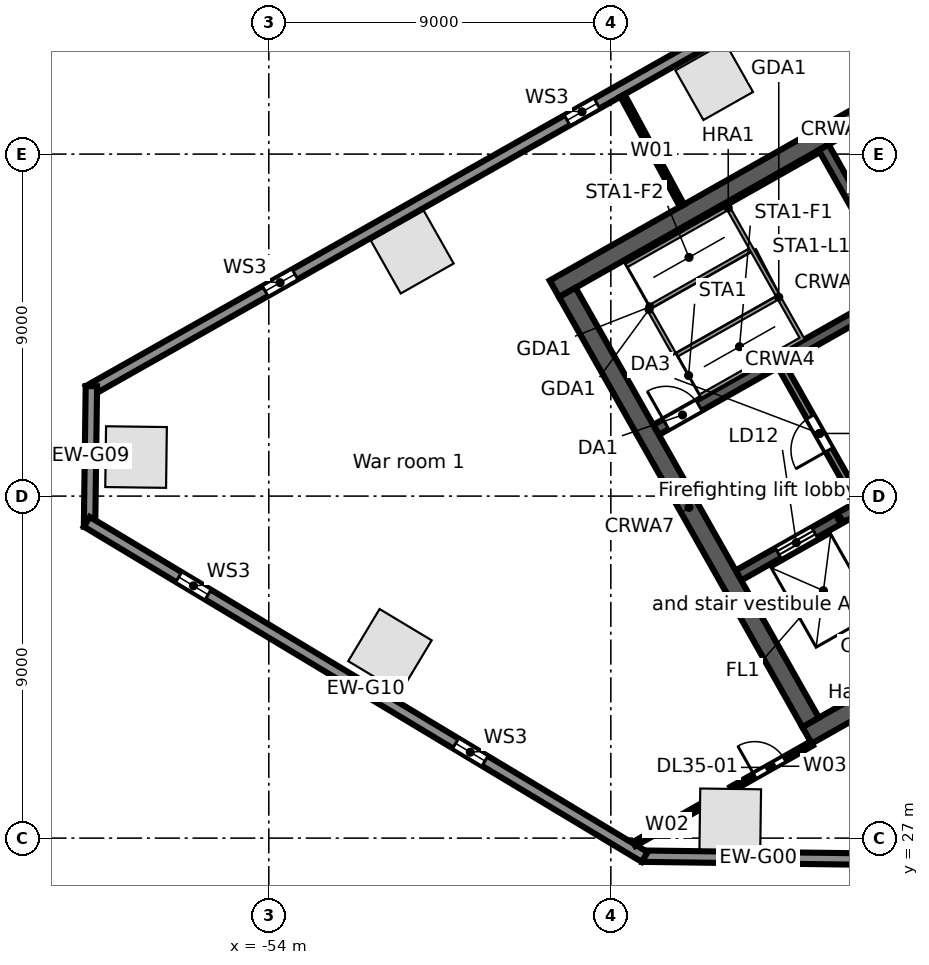
"""IFC4 building model, lengths in metres.
Left out: names, types, materials, properties, quantities, classifications, styles, units other than length and angle.
Written with IfcOpenShell. Run it as: python <this file> out.ifc"""

import sys

from ifc_helpers import new_model, si_unit, direction, frame, frame_2d, origin, origin_2d, place, context, subcontext, project, spatial, rectangle, extrude, element, fill, save


model = new_model("IFC4")
c1 = context("Model", 3, precision=1e-05, world=origin(), true_north=direction((0.0, 1.0)))
c2 = subcontext(c1, "Body", "Model", "MODEL_VIEW")
j1 = project(units=[si_unit("LENGTHUNIT", "METRE"), si_unit("PLANEANGLEUNIT", "RADIAN")], contexts=[c1])
p1 = place(None, origin())
s1 = spatial("IfcSite", under=j1, at=p1, CompositionType="ELEMENT")
p2 = place(p1, origin())
s2 = spatial("IfcBuilding", under=s1, at=p2, CompositionType="ELEMENT")
p3 = place(p2, frame((0.0, 0.0, 166.9)))
s3 = spatial("IfcBuildingStorey", under=s2, at=p3, CompositionType="ELEMENT", Elevation=166.9)
p4 = place(p3, frame((-42.28, 46.919, 0.0), z_axis=(0.0, 0.0, 1.0), x_axis=(-0.87035569594, -0.492423560103, 0.0)))
e1 = element("IfcColumn", 1, at=p4, inside=s3, PredefinedType="COLUMN", context=c2, shape_type="SweptSolid", body=[
    extrude(rectangle(XDim=1.5, YDim=1.5, at=origin_2d()), origin(), (0.0, 0.0, 1.0), 4.0),
])
for number, where, z_axis, x_axis in (
    (2, (-50.226, 42.423, 0.0), (0.0, 0.0, 1.0), (-0.87, -0.492, 0.0)),
    (3, (-57.493, 37.027, 0.0), (0.0, 0.0, 1.0), (-0.013, -1.0, 0.0)),
    (4, (-50.812, 31.931, 0.0), (0.0, 0.0, 1.0), (0.857, -0.515, 0.0)),
    (5, (-41.858, 27.495, 0.0), (0.0, 0.0, 1.0), (1.0, -0.013, 0.0)),
):
    element("IfcColumn", number, at=place(p3, frame(where, z_axis=z_axis, x_axis=x_axis)), inside=s3, PredefinedType="COLUMN", context=c2, shape_type="SweptSolid", body=[
        extrude(rectangle(XDim=1.6, YDim=1.6, at=origin_2d()), origin(), (0.0, 0.0, 1.0), 4.0),
    ])
p5 = place(p3, frame((-38.057, 26.445, 0.0), z_axis=(0.0, 0.0, 1.0), x_axis=(-0.999914086342, 0.013108010296, 0.0)))
e6 = element("IfcWall", 6, at=p5, inside=s3, PredefinedType="STANDARD", context=c2, shape_type="SweptSolid", body=[
    extrude(rectangle(XDim=6.128, YDim=0.3, at=frame_2d((3.064, 0.0))), origin(), (0.0, 0.0, 1.0), 3.68),
])
p6 = place(p3, frame((-58.745, 38.764, 0.0), z_axis=(0.0, 0.0, 1.0), x_axis=(0.870355811726, 0.492423355453, 0.0)))
e7 = element("IfcWall", 7, at=p6, inside=s3, PredefinedType="STANDARD", context=c2, shape_type="SweptSolid", body=[
    extrude(rectangle(XDim=64.025, YDim=0.3, at=frame_2d((32.013, 0.0))), origin(), (0.0, 0.0, 1.0), 3.68),
])
p7 = place(p6, frame((60.122, 0.0, 0.6)))
e8 = element("IfcOpeningElement", 8, at=p7, cuts=e7, PredefinedType="OPENING", context=c2, shape_type="SweptSolid", body=[
    extrude(rectangle(XDim=0.9, YDim=2.4, at=frame_2d((0.45, 1.2))), frame((0.0, 0.16, 0.0), z_axis=(0.0, -1.0, 0.0), x_axis=(1.0, 0.0, 0.0)), (0.0, 0.0, 1.0), 0.32),
])
p8 = place(p6, frame((50.992, 0.0, 0.6)))
e9 = element("IfcOpeningElement", 9, at=p8, cuts=e7, PredefinedType="OPENING", context=c2, shape_type="SweptSolid", body=[
    extrude(rectangle(XDim=0.9, YDim=2.4, at=frame_2d((0.45, 1.2))), frame((0.0, 0.16, 0.0), z_axis=(0.0, -1.0, 0.0), x_axis=(1.0, 0.0, 0.0)), (0.0, 0.0, 1.0), 0.32),
])
p9 = place(p6, frame((41.862, 0.0, 0.6)))
e10 = element("IfcOpeningElement", 10, at=p9, cuts=e7, PredefinedType="OPENING", context=c2, shape_type="SweptSolid", body=[
    extrude(rectangle(XDim=0.9, YDim=2.4, at=frame_2d((0.45, 1.2))), frame((0.0, 0.16, 0.0), z_axis=(0.0, -1.0, 0.0), x_axis=(1.0, 0.0, 0.0)), (0.0, 0.0, 1.0), 0.32),
])
p10 = place(p6, frame((32.732, 0.0, 0.6)))
e11 = element("IfcOpeningElement", 11, at=p10, cuts=e7, PredefinedType="OPENING", context=c2, shape_type="SweptSolid", body=[
    extrude(rectangle(XDim=0.9, YDim=2.4, at=frame_2d((0.45, 1.2))), frame((0.0, 0.16, 0.0), z_axis=(0.0, -1.0, 0.0), x_axis=(1.0, 0.0, 0.0)), (0.0, 0.0, 1.0), 0.32),
])
p11 = place(p6, frame((23.602, 0.0, 0.6)))
e12 = element("IfcOpeningElement", 12, at=p11, cuts=e7, PredefinedType="OPENING", context=c2, shape_type="SweptSolid", body=[
    extrude(rectangle(XDim=0.9, YDim=2.4, at=frame_2d((0.45, 1.2))), frame((0.0, 0.16, 0.0), z_axis=(0.0, -1.0, 0.0), x_axis=(1.0, 0.0, 0.0)), (0.0, 0.0, 1.0), 0.32),
])
p12 = place(p6, frame((14.472, 0.0, 0.6)))
e13 = element("IfcOpeningElement", 13, at=p12, cuts=e7, PredefinedType="OPENING", context=c2, shape_type="SweptSolid", body=[
    extrude(rectangle(XDim=0.9, YDim=2.4, at=frame_2d((0.45, 1.2))), frame((0.0, 0.16, 0.0), z_axis=(0.0, -1.0, 0.0), x_axis=(1.0, 0.0, 0.0)), (0.0, 0.0, 1.0), 0.32),
])
p13 = place(p6, frame((5.342, 0.0, 0.6)))
e14 = element("IfcOpeningElement", 14, at=p13, cuts=e7, PredefinedType="OPENING", context=c2, shape_type="SweptSolid", body=[
    extrude(rectangle(XDim=0.9, YDim=2.4, at=frame_2d((0.45, 1.2))), frame((0.0, 0.16, 0.0), z_axis=(0.0, -1.0, 0.0), x_axis=(1.0, 0.0, 0.0)), (0.0, 0.0, 1.0), 0.32),
])
p14 = place(p3, frame((-58.717, 35.194, 0.0), z_axis=(0.0, 0.0, 1.0), x_axis=(0.013069053407, 0.999914596275, 0.0)))
e15 = element("IfcWall", 15, at=p14, inside=s3, PredefinedType="STANDARD", context=c2, shape_type="SweptSolid", body=[
    extrude(rectangle(XDim=3.699, YDim=0.3, at=frame_2d((1.849, 0.0))), origin(), (0.0, 0.0, 1.0), 3.68),
])
p15 = place(p3, frame((-44.109, 26.504, 0.0), z_axis=(0.0, 0.0, 1.0), x_axis=(-0.857169502585, 0.515034410344, 0.0)))
e16 = element("IfcWall", 16, at=p15, inside=s3, PredefinedType="STANDARD", context=c2, shape_type="SweptSolid", body=[
    extrude(rectangle(XDim=17.127, YDim=0.3, at=frame_2d((8.563, 0.0))), origin(), (0.0, 0.0, 1.0), 3.68),
])
p16 = place(p15, frame((13.403, 0.0, 0.6)))
e17 = element("IfcOpeningElement", 17, at=p16, cuts=e16, PredefinedType="OPENING", context=c2, shape_type="SweptSolid", body=[
    extrude(rectangle(XDim=0.9, YDim=2.4, at=frame_2d((0.45, 1.2))), frame((0.0, 0.16, 0.0), z_axis=(0.0, -1.0, 0.0), x_axis=(1.0, 0.0, 0.0)), (0.0, 0.0, 1.0), 0.32),
])
p17 = place(p15, frame((4.903, 0.0, 0.6)))
e18 = element("IfcOpeningElement", 18, at=p17, cuts=e16, PredefinedType="OPENING", context=c2, shape_type="SweptSolid", body=[
    extrude(rectangle(XDim=0.9, YDim=2.4, at=frame_2d((0.45, 1.2))), frame((0.0, 0.16, 0.0), z_axis=(0.0, -1.0, 0.0), x_axis=(1.0, 0.0, 0.0)), (0.0, 0.0, 1.0), 0.32),
])
p18 = place(p3, frame((-39.838, 29.705, 0.0), z_axis=(0.0, 0.0, 1.0), x_axis=(0.870350116061, 0.492433422375, 0.0)))
e19 = element("IfcWall", 19, at=p18, inside=s3, PredefinedType="SOLIDWALL", context=c2, shape_type="SweptSolid", body=[
    extrude(rectangle(XDim=17.0, YDim=0.5, at=frame_2d((8.5, 0.0))), origin(), (0.0, 0.0, 1.0), 3.68),
])
p19 = place(p18, frame((7.2, 0.0, 0.0)))
e20 = element("IfcOpeningElement", 20, at=p19, cuts=e19, PredefinedType="OPENING", context=c2, shape_type="SweptSolid", body=[
    extrude(rectangle(XDim=1.2, YDim=2.1, at=frame_2d((0.6, 1.05))), frame((0.0, 0.26, 0.0), z_axis=(0.0, -1.0, 0.0), x_axis=(1.0, 0.0, 0.0)), (0.0, 0.0, 1.0), 0.52),
])
p20 = place(p3, frame((-41.643, 33.912, 0.0), z_axis=(0.0, 0.0, 1.0), x_axis=(0.870343599782, 0.492444939378, 0.0)))
e21 = element("IfcWall", 21, at=p20, inside=s3, PredefinedType="SOLIDWALL", context=c2, shape_type="SweptSolid", body=[
    extrude(rectangle(XDim=6.1, YDim=0.3, at=frame_2d((3.05, 0.0))), origin(), (0.0, 0.0, 1.0), 3.68),
])
p21 = place(p20, frame((1.2, 0.0, 0.0)))
e22 = element("IfcOpeningElement", 22, at=p21, cuts=e21, PredefinedType="OPENING", context=c2, shape_type="SweptSolid", body=[
    extrude(rectangle(XDim=1.1, YDim=2.1, at=frame_2d((0.55, 1.05))), frame((0.0, 0.16, 0.0), z_axis=(0.0, -1.0, 0.0), x_axis=(1.0, 0.0, 0.0)), (0.0, 0.0, 1.0), 0.32),
])
p22 = place(p20, frame((4.35, 0.0, 0.0)))
e23 = element("IfcOpeningElement", 23, at=p22, cuts=e21, PredefinedType="OPENING", context=c2, shape_type="SweptSolid", body=[
    extrude(rectangle(XDim=1.1, YDim=2.1, at=frame_2d((0.55, 1.05))), frame((0.0, 0.16, 0.0), z_axis=(0.0, -1.0, 0.0), x_axis=(1.0, 0.0, 0.0)), (0.0, 0.0, 1.0), 0.32),
])
p23 = place(p3, frame((-43.81, 37.741, 0.0), z_axis=(0.0, 0.0, 1.0), x_axis=(0.870350569555, 0.492432620848, 0.0)))
e24 = element("IfcWall", 24, at=p23, inside=s3, PredefinedType="SOLIDWALL", context=c2, shape_type="SweptSolid", body=[
    extrude(rectangle(XDim=7.5, YDim=0.3, at=frame_2d((3.75, 0.0))), origin(), (0.0, 0.0, 1.0), 3.68),
])
p24 = place(p23, frame((0.3, 0.0, 0.0)))
e25 = element("IfcOpeningElement", 25, at=p24, cuts=e24, PredefinedType="OPENING", context=c2, shape_type="SweptSolid", body=[
    extrude(rectangle(XDim=1.0, YDim=2.1, at=frame_2d((0.5, 1.05))), frame((0.0, 0.16, 0.0), z_axis=(0.0, -1.0, 0.0), x_axis=(1.0, 0.0, 0.0)), (0.0, 0.0, 1.0), 0.32),
])
p25 = place(p3, frame((-46.486, 41.455, 0.0), z_axis=(0.0, 0.0, 1.0), x_axis=(0.870353598469, 0.492427267353, 0.0)))
e26 = element("IfcWall", 26, at=p25, inside=s3, PredefinedType="SOLIDWALL", context=c2, shape_type="SweptSolid", body=[
    extrude(rectangle(XDim=17.0, YDim=0.5, at=frame_2d((8.5, 0.0))), origin(), (0.0, 0.0, 1.0), 3.68),
])
p26 = place(p3, frame((-46.145, 41.361, 0.0), z_axis=(0.0, 0.0, 1.0), x_axis=(0.492435316254, -0.870349044525, 0.0)))
e27 = element("IfcWall", 27, at=p26, inside=s3, PredefinedType="SOLIDWALL", context=c2, shape_type="SweptSolid", body=[
    extrude(rectangle(XDim=13.0, YDim=0.5, at=frame_2d((6.5, 0.0))), origin(), (0.0, 0.0, 1.0), 3.68),
])
p27 = place(p3, frame((-40.516, 39.433, 0.0), z_axis=(0.0, 0.0, 1.0), x_axis=(0.492453559952, -0.87033872216, 0.0)))
e28 = element("IfcWall", 28, at=p27, inside=s3, PredefinedType="PARTITIONING", context=c2, shape_type="SweptSolid", body=[
    extrude(rectangle(XDim=4.1, YDim=0.2, at=frame_2d((2.05, 0.0))), origin(), (0.0, 0.0, 1.0), 3.68),
])
p28 = place(p27, frame((1.55, 0.0, 0.0)))
e29 = element("IfcOpeningElement", 29, at=p28, cuts=e28, PredefinedType="OPENING", context=c2, shape_type="SweptSolid", body=[
    extrude(rectangle(XDim=1.0, YDim=2.1, at=frame_2d((0.5, 1.05))), frame((0.0, 0.11, 0.0), z_axis=(0.0, -1.0, 0.0), x_axis=(1.0, 0.0, 0.0)), (0.0, 0.0, 1.0), 0.22),
])
p29 = place(p3, frame((-39.399, 45.177, 0.0), z_axis=(0.0, 0.0, 1.0), x_axis=(0.492396453737, -0.870371031427, 0.0)))
e30 = element("IfcWall", 30, at=p29, inside=s3, PredefinedType="SOLIDWALL", context=c2, shape_type="SweptSolid", body=[
    extrude(rectangle(XDim=4.15, YDim=0.3, at=frame_2d((2.075, 0.0))), origin(), (0.0, 0.0, 1.0), 3.68),
])
p30 = place(p3, frame((-44.693, 46.542, 0.0), z_axis=(0.0, 0.0, 1.0), x_axis=(0.475199384016, -0.879878142376, 0.0)))
e31 = element("IfcWall", 31, at=p30, inside=s3, PredefinedType="PARTITIONING", context=c2, shape_type="SweptSolid", body=[
    extrude(rectangle(XDim=3.296, YDim=0.125, at=frame_2d((1.648, 0.0))), origin(), (0.0, 0.0, 1.0), 2.96),
])
p31 = place(p3, frame((-44.386, 26.845, 0.0), z_axis=(0.0, 0.0, 1.0), x_axis=(0.870453184796, 0.492251209322, 0.0)))
e32 = element("IfcWall", 32, at=p31, inside=s3, PredefinedType="PARTITIONING", context=c2, shape_type="SweptSolid", body=[
    extrude(rectangle(XDim=1.991, YDim=0.125, at=frame_2d((0.995, 0.0))), origin(), (0.0, 0.0, 1.0), 3.68),
])
p32 = place(p3, frame((-41.824, 28.294, 0.0), z_axis=(0.0, 0.0, 1.0), x_axis=(0.870189216305, 0.492717695873, 0.0)))
e33 = element("IfcWall", 33, at=p32, inside=s3, PredefinedType="PARTITIONING", context=c2, shape_type="SweptSolid", body=[
    extrude(rectangle(XDim=2.424, YDim=0.125, at=frame_2d((1.212, 0.0))), origin(), (0.0, 0.0, 1.0), 3.68),
])
p33 = place(p32, frame((0.7, 0.0, 0.0)))
e34 = element("IfcOpeningElement", 34, at=p33, cuts=e33, PredefinedType="OPENING", context=c2, shape_type="SweptSolid", body=[
    extrude(rectangle(XDim=0.9, YDim=2.1, at=frame_2d((0.45, 1.05))), frame((0.0, 0.073, 0.0), z_axis=(0.0, -1.0, 0.0), x_axis=(1.0, 0.0, 0.0)), (0.0, 0.0, 1.0), 0.145),
])
p34 = place(p12, origin())
e35 = element("IfcWindow", 35, at=p34, inside=s3, PartitioningType="SINGLE_PANEL", PredefinedType="WINDOW", context=c2, shape_type="SweptSolid", body=[
    extrude(rectangle(XDim=0.9, YDim=2.4, at=frame_2d((0.45, 1.2))), frame((0.0, 0.03, 0.0), z_axis=(0.0, -1.0, 0.0), x_axis=(1.0, 0.0, 0.0)), (0.0, 0.0, 1.0), 0.06),
])
fill(e13, e35)
p35 = place(p13, origin())
e36 = element("IfcWindow", 36, at=p35, inside=s3, PartitioningType="SINGLE_PANEL", PredefinedType="WINDOW", context=c2, shape_type="SweptSolid", body=[
    extrude(rectangle(XDim=0.9, YDim=2.4, at=frame_2d((0.45, 1.2))), frame((0.0, 0.03, 0.0), z_axis=(0.0, -1.0, 0.0), x_axis=(1.0, 0.0, 0.0)), (0.0, 0.0, 1.0), 0.06),
])
fill(e14, e36)
p36 = place(p16, origin())
e37 = element("IfcWindow", 37, at=p36, inside=s3, PartitioningType="SINGLE_PANEL", PredefinedType="WINDOW", context=c2, shape_type="SweptSolid", body=[
    extrude(rectangle(XDim=0.9, YDim=2.4, at=frame_2d((0.45, 1.2))), frame((0.0, 0.03, 0.0), z_axis=(0.0, -1.0, 0.0), x_axis=(1.0, 0.0, 0.0)), (0.0, 0.0, 1.0), 0.06),
])
fill(e17, e37)
p37 = place(p17, origin())
e38 = element("IfcWindow", 38, at=p37, inside=s3, PartitioningType="SINGLE_PANEL", PredefinedType="WINDOW", context=c2, shape_type="SweptSolid", body=[
    extrude(rectangle(XDim=0.9, YDim=2.4, at=frame_2d((0.45, 1.2))), frame((0.0, 0.03, 0.0), z_axis=(0.0, -1.0, 0.0), x_axis=(1.0, 0.0, 0.0)), (0.0, 0.0, 1.0), 0.06),
])
fill(e18, e38)
p38 = place(p21, origin())
e39 = element("IfcDoor", 39, at=p38, inside=s3, OperationType="DOUBLE_DOOR_SLIDING", PredefinedType="DOOR", context=c2, shape_type="SweptSolid", body=[
    extrude(rectangle(XDim=1.1, YDim=2.1, at=frame_2d((0.55, 1.05))), frame((0.0, 0.025, 0.0), z_axis=(0.0, -1.0, 0.0), x_axis=(1.0, 0.0, 0.0)), (0.0, 0.0, 1.0), 0.05),
])
fill(e22, e39)
p39 = place(p24, origin())
e40 = element("IfcDoor", 40, at=p39, inside=s3, OperationType="SINGLE_SWING_LEFT", PredefinedType="DOOR", context=c2, shape_type="SweptSolid", body=[
    extrude(rectangle(XDim=1.0, YDim=2.1, at=frame_2d((0.5, 1.05))), frame((0.0, 0.025, 0.0), z_axis=(0.0, -1.0, 0.0), x_axis=(1.0, 0.0, 0.0)), (0.0, 0.0, 1.0), 0.05),
])
fill(e25, e40)
p40 = place(p28, frame((1.0, 0.0, 0.0), z_axis=(0.0, 0.0, 1.0), x_axis=(-1.0, 0.0, 0.0)))
e41 = element("IfcDoor", 41, at=p40, inside=s3, OperationType="SINGLE_SWING_LEFT", PredefinedType="DOOR", context=c2, shape_type="SweptSolid", body=[
    extrude(rectangle(XDim=1.0, YDim=2.1, at=frame_2d((0.5, 1.05))), frame((0.0, 0.025, 0.0), z_axis=(0.0, -1.0, 0.0), x_axis=(1.0, 0.0, 0.0)), (0.0, 0.0, 1.0), 0.05),
])
fill(e29, e41)
p41 = place(p33, origin())
e42 = element("IfcDoor", 42, at=p41, inside=s3, OperationType="SINGLE_SWING_LEFT", PredefinedType="DOOR", context=c2, shape_type="SweptSolid", body=[
    extrude(rectangle(XDim=0.9, YDim=2.1, at=frame_2d((0.45, 1.05))), frame((0.0, 0.025, 0.0), z_axis=(0.0, -1.0, 0.0), x_axis=(1.0, 0.0, 0.0)), (0.0, 0.0, 1.0), 0.05),
])
fill(e34, e42)
save(model, sys.argv[1])
